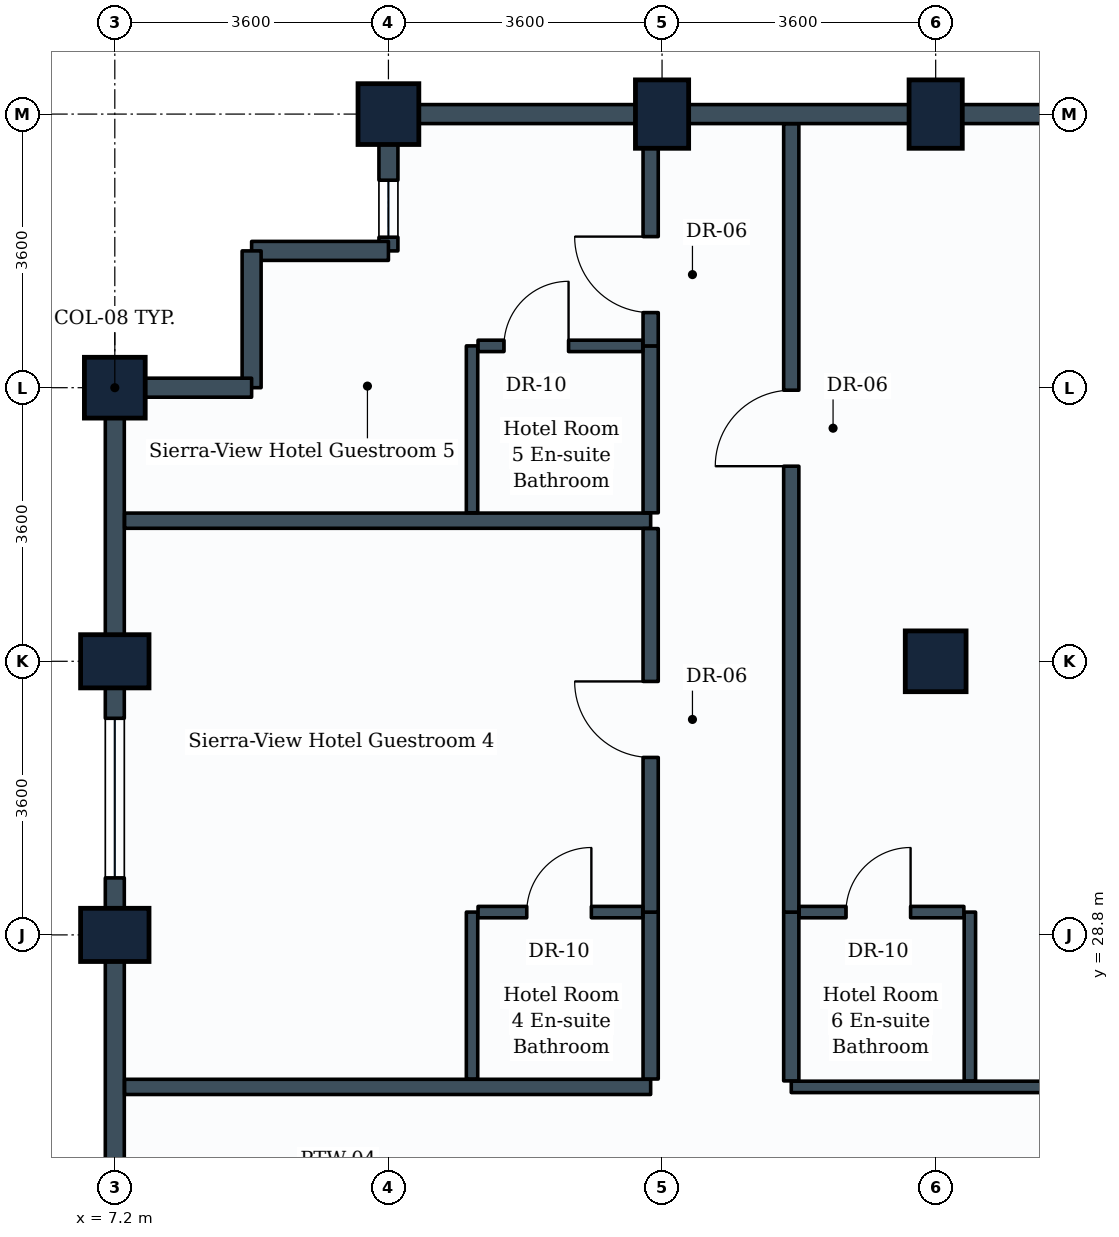
"""IFC4 building model, lengths in metres.
Left out: names, types, materials, properties, quantities, classifications, styles, units other than length and angle.
Written with IfcOpenShell. Run it as: python <this file> out.ifc"""

import sys

from ifc_helpers import new_model, si_unit, direction, frame, frame_2d, origin, origin_2d, place, context, subcontext, project, spatial, rectangle, extrude, element, fill, save


model = new_model("IFC4")
c1 = context("Model", 3, precision=1e-05, world=origin(), true_north=direction((0.0, 1.0)))
c2 = subcontext(c1, "Body", "Model", "MODEL_VIEW")
j1 = project(units=[si_unit("LENGTHUNIT", "METRE"), si_unit("PLANEANGLEUNIT", "RADIAN")], contexts=[c1])
p1 = place(None, origin())
s1 = spatial("IfcSite", under=j1, at=p1, CompositionType="ELEMENT")
p2 = place(p1, origin())
s2 = spatial("IfcBuilding", under=s1, at=p2, CompositionType="ELEMENT")
p3 = place(p2, frame((0.0, 0.0, 217.4)))
s3 = spatial("IfcBuildingStorey", under=s2, at=p3, CompositionType="ELEMENT", Elevation=217.4)
for number, where, z_axis, x_axis in (
    (1, (7.2, 28.8, 0.0), (0.0, 0.0, 1.0), (0.0, 1.0, 0.0)),
    (2, (7.2, 32.4, 0.0), (0.0, 0.0, 1.0), (0.0, 1.0, 0.0)),
):
    element("IfcColumn", number, at=place(p3, frame(where, z_axis=z_axis, x_axis=x_axis)), inside=s3, PredefinedType="COLUMN", context=c2, shape_type="SweptSolid", body=[
        extrude(rectangle(XDim=0.7, YDim=0.9, at=origin_2d()), origin(), (0.0, 0.0, 1.0), 3.6),
    ])
for number, where, z_axis, x_axis in (
    (3, (7.2, 36.0, 0.0), (0.0, 0.0, 1.0), (0.0, 1.0, 0.0)),
    (4, (10.8, 39.6, 0.0), (0.0, 0.0, 1.0), (1.0, 0.0, 0.0)),
):
    element("IfcColumn", number, at=place(p3, frame(where, z_axis=z_axis, x_axis=x_axis)), inside=s3, PredefinedType="COLUMN", context=c2, shape_type="SweptSolid", body=[
        extrude(rectangle(XDim=0.8, YDim=0.8, at=origin_2d()), origin(), (0.0, 0.0, 1.0), 3.6),
    ])
p4 = place(p3, frame((14.4, 39.6, 0.0), z_axis=(0.0, 0.0, 1.0), x_axis=(1.0, 0.0, 0.0)))
e5 = element("IfcColumn", 5, at=p4, inside=s3, PredefinedType="COLUMN", context=c2, shape_type="SweptSolid", body=[
    extrude(rectangle(XDim=0.7, YDim=0.9, at=origin_2d()), origin(), (0.0, 0.0, 1.0), 3.6),
])
p5 = place(p3, frame((18.0, 32.4, 0.0), z_axis=(0.0, 0.0, 1.0), x_axis=(1.0, 0.0, 0.0)))
e6 = element("IfcColumn", 6, at=p5, inside=s3, PredefinedType="COLUMN", context=c2, shape_type="SweptSolid", body=[
    extrude(rectangle(XDim=0.8, YDim=0.8, at=origin_2d()), origin(), (0.0, 0.0, 1.0), 3.6),
])
p6 = place(p3, frame((18.0, 39.6, 0.0), z_axis=(0.0, 0.0, 1.0), x_axis=(1.0, 0.0, 0.0)))
e7 = element("IfcColumn", 7, at=p6, inside=s3, PredefinedType="COLUMN", context=c2, shape_type="SweptSolid", body=[
    extrude(rectangle(XDim=0.7, YDim=0.9, at=origin_2d()), origin(), (0.0, 0.0, 1.0), 3.6),
])
for number, where, z_axis, x_axis in (
    (8, (18.0, 39.6, 0.0), (0.0, 0.0, 1.0), (1.0, 0.0, 0.0)),
    (9, (14.4, 39.6, 0.0), (0.0, 0.0, 1.0), (1.0, 0.0, 0.0)),
):
    element("IfcWall", number, at=place(p3, frame(where, z_axis=z_axis, x_axis=x_axis)), inside=s3, PredefinedType="STANDARD", context=c2, shape_type="SweptSolid", body=[
        extrude(rectangle(XDim=3.6, YDim=0.25, at=frame_2d((1.8, 0.0))), origin(), (0.0, 0.0, 1.0), 2.23),
    ])
p7 = place(p3, frame((10.8, 39.6, 0.0), z_axis=(0.0, 0.0, 1.0), x_axis=(1.0, 0.0, 0.0)))
e10 = element("IfcWall", 10, at=p7, inside=s3, PredefinedType="STANDARD", context=c2, shape_type="SweptSolid", body=[
    extrude(rectangle(XDim=3.6, YDim=0.25, at=frame_2d((1.8, 0.0))), origin(), (0.0, 0.0, 1.0), 2.23),
])
p8 = place(p3, frame((10.8, 37.8, 0.0), z_axis=(0.0, 0.0, 1.0), x_axis=(0.0, 1.0, 0.0)))
e11 = element("IfcWall", 11, at=p8, inside=s3, PredefinedType="STANDARD", context=c2, shape_type="SweptSolid", body=[
    extrude(rectangle(XDim=1.8, YDim=0.25, at=frame_2d((0.9, 0.0))), origin(), (0.0, 0.0, 1.0), 2.23),
])
p9 = place(p8, frame((0.18, 0.0, 0.85)))
e12 = element("IfcOpeningElement", 12, at=p9, cuts=e11, PredefinedType="OPENING", context=c2, shape_type="SweptSolid", body=[
    extrude(rectangle(XDim=0.75, YDim=1.05, at=frame_2d((0.375, 0.525))), frame((0.0, 0.135, 0.0), z_axis=(0.0, -1.0, 0.0), x_axis=(1.0, 0.0, 0.0)), (0.0, 0.0, 1.0), 0.27),
])
p10 = place(p3, frame((9.0, 37.8, 0.0), z_axis=(0.0, 0.0, 1.0), x_axis=(1.0, 0.0, 0.0)))
e13 = element("IfcWall", 13, at=p10, inside=s3, PredefinedType="STANDARD", context=c2, shape_type="SweptSolid", body=[
    extrude(rectangle(XDim=1.8, YDim=0.25, at=frame_2d((0.9, 0.0))), origin(), (0.0, 0.0, 1.0), 3.265),
])
for number, where, z_axis, x_axis in (
    (14, (9.0, 36.0, 0.0), (0.0, 0.0, 1.0), (0.0, 1.0, 0.0)),
    (15, (7.2, 36.0, 0.0), (0.0, 0.0, 1.0), (1.0, 0.0, 0.0)),
):
    element("IfcWall", number, at=place(p3, frame(where, z_axis=z_axis, x_axis=x_axis)), inside=s3, PredefinedType="STANDARD", context=c2, shape_type="SweptSolid", body=[
        extrude(rectangle(XDim=1.8, YDim=0.25, at=frame_2d((0.9, 0.0))), origin(), (0.0, 0.0, 1.0), 2.23),
    ])
p11 = place(p3, frame((7.2, 32.4, 0.0), z_axis=(0.0, 0.0, 1.0), x_axis=(0.0, 1.0, 0.0)))
e16 = element("IfcWall", 16, at=p11, inside=s3, PredefinedType="STANDARD", context=c2, shape_type="SweptSolid", body=[
    extrude(rectangle(XDim=3.6, YDim=0.25, at=frame_2d((1.8, 0.0))), origin(), (0.0, 0.0, 1.0), 2.23),
])
p12 = place(p3, frame((7.2, 28.8, 0.0), z_axis=(0.0, 0.0, 1.0), x_axis=(0.0, 1.0, 0.0)))
e17 = element("IfcWall", 17, at=p12, inside=s3, PredefinedType="STANDARD", context=c2, shape_type="SweptSolid", body=[
    extrude(rectangle(XDim=3.6, YDim=0.25, at=frame_2d((1.8, 0.0))), origin(), (0.0, 0.0, 1.0), 2.83),
])
p13 = place(p12, frame((0.75, 0.0, 0.85)))
e18 = element("IfcOpeningElement", 18, at=p13, cuts=e17, PredefinedType="OPENING", context=c2, shape_type="SweptSolid", body=[
    extrude(rectangle(XDim=2.1, YDim=1.35, at=frame_2d((1.05, 0.675))), frame((0.0, 0.135, 0.0), z_axis=(0.0, -1.0, 0.0), x_axis=(1.0, 0.0, 0.0)), (0.0, 0.0, 1.0), 0.27),
])
p14 = place(p3, frame((7.2, 25.2, 0.0), z_axis=(0.0, 0.0, 1.0), x_axis=(0.0, 1.0, 0.0)))
e19 = element("IfcWall", 19, at=p14, inside=s3, PredefinedType="STANDARD", context=c2, shape_type="SweptSolid", body=[
    extrude(rectangle(XDim=3.6, YDim=0.25, at=frame_2d((1.8, 0.0))), origin(), (0.0, 0.0, 1.0), 2.83),
])
p15 = place(p3, frame((7.329, 26.8, 0.0), z_axis=(0.0, 0.0, 1.0), x_axis=(1.0, 0.0, 0.0)))
e20 = element("IfcWall", 20, at=p15, inside=s3, PredefinedType="PARTITIONING", context=c2, shape_type="SweptSolid", body=[
    extrude(rectangle(XDim=6.921, YDim=0.2, at=frame_2d((3.46, 0.0))), origin(), (0.0, 0.0, 1.0), 2.83),
])
p16 = place(p3, frame((7.329, 34.25, 0.0), z_axis=(0.0, 0.0, 1.0), x_axis=(1.0, 0.0, 0.0)))
e21 = element("IfcWall", 21, at=p16, inside=s3, PredefinedType="PARTITIONING", context=c2, shape_type="SweptSolid", body=[
    extrude(rectangle(XDim=6.921, YDim=0.2, at=frame_2d((3.46, 0.0))), origin(), (0.0, 0.0, 1.0), 3.265),
])
p17 = place(p3, frame((14.25, 26.904, 0.0), z_axis=(0.0, 0.0, 1.0), x_axis=(0.0, 1.0, 0.0)))
e22 = element("IfcWall", 22, at=p17, inside=s3, PredefinedType="PARTITIONING", context=c2, shape_type="SweptSolid", body=[
    extrude(rectangle(XDim=2.196, YDim=0.2, at=frame_2d((1.098, 0.0))), origin(), (0.0, 0.0, 1.0), 2.95),
])
p18 = place(p3, frame((14.25, 29.1, 0.0), z_axis=(0.0, 0.0, 1.0), x_axis=(0.0, 1.0, 0.0)))
e23 = element("IfcWall", 23, at=p18, inside=s3, PredefinedType="PARTITIONING", context=c2, shape_type="SweptSolid", body=[
    extrude(rectangle(XDim=5.046, YDim=0.2, at=frame_2d((2.523, 0.0))), origin(), (0.0, 0.0, 1.0), 3.265),
])
p19 = place(p18, frame((2.035, 0.0, 0.0)))
e24 = element("IfcOpeningElement", 24, at=p19, cuts=e23, PredefinedType="OPENING", context=c2, shape_type="SweptSolid", body=[
    extrude(rectangle(XDim=1.0, YDim=2.1, at=frame_2d((0.5, 1.05))), frame((0.0, 0.11, 0.0), z_axis=(0.0, -1.0, 0.0), x_axis=(1.0, 0.0, 0.0)), (0.0, 0.0, 1.0), 0.22),
])
p20 = place(p3, frame((11.9, 26.904, 0.0), z_axis=(0.0, 0.0, 1.0), x_axis=(0.0, 1.0, 0.0)))
e25 = element("IfcWall", 25, at=p20, inside=s3, PredefinedType="PARTITIONING", context=c2, shape_type="SweptSolid", body=[
    extrude(rectangle(XDim=2.196, YDim=0.15, at=frame_2d((1.098, 0.0))), origin(), (0.0, 0.0, 1.0), 2.95),
])
p21 = place(p3, frame((11.979, 29.1, 0.0), z_axis=(0.0, 0.0, 1.0), x_axis=(1.0, 0.0, 0.0)))
e26 = element("IfcWall", 26, at=p21, inside=s3, PredefinedType="PARTITIONING", context=c2, shape_type="SweptSolid", body=[
    extrude(rectangle(XDim=2.167, YDim=0.15, at=frame_2d((1.083, 0.0))), origin(), (0.0, 0.0, 1.0), 3.265),
])
p22 = place(p21, frame((0.641, 0.0, 0.0)))
e27 = element("IfcOpeningElement", 27, at=p22, cuts=e26, PredefinedType="OPENING", context=c2, shape_type="SweptSolid", body=[
    extrude(rectangle(XDim=0.85, YDim=2.1, at=frame_2d((0.425, 1.05))), frame((0.0, 0.085, 0.0), z_axis=(0.0, -1.0, 0.0), x_axis=(1.0, 0.0, 0.0)), (0.0, 0.0, 1.0), 0.17),
])
p23 = place(p3, frame((14.25, 34.354, 0.0), z_axis=(0.0, 0.0, 1.0), x_axis=(0.0, 1.0, 0.0)))
e28 = element("IfcWall", 28, at=p23, inside=s3, PredefinedType="PARTITIONING", context=c2, shape_type="SweptSolid", body=[
    extrude(rectangle(XDim=2.196, YDim=0.2, at=frame_2d((1.098, 0.0))), origin(), (0.0, 0.0, 1.0), 2.23),
])
p24 = place(p3, frame((14.25, 36.55, 0.0), z_axis=(0.0, 0.0, 1.0), x_axis=(0.0, 1.0, 0.0)))
e29 = element("IfcWall", 29, at=p24, inside=s3, PredefinedType="PARTITIONING", context=c2, shape_type="SweptSolid", body=[
    extrude(rectangle(XDim=2.921, YDim=0.2, at=frame_2d((1.46, 0.0))), origin(), (0.0, 0.0, 1.0), 2.23),
])
p25 = place(p24, frame((0.438, 0.0, 0.0)))
e30 = element("IfcOpeningElement", 30, at=p25, cuts=e29, PredefinedType="OPENING", context=c2, shape_type="SweptSolid", body=[
    extrude(rectangle(XDim=1.0, YDim=2.1, at=frame_2d((0.5, 1.05))), frame((0.0, 0.11, 0.0), z_axis=(0.0, -1.0, 0.0), x_axis=(1.0, 0.0, 0.0)), (0.0, 0.0, 1.0), 0.22),
])
p26 = place(p3, frame((11.9, 34.354, 0.0), z_axis=(0.0, 0.0, 1.0), x_axis=(0.0, 1.0, 0.0)))
e31 = element("IfcWall", 31, at=p26, inside=s3, PredefinedType="PARTITIONING", context=c2, shape_type="SweptSolid", body=[
    extrude(rectangle(XDim=2.196, YDim=0.15, at=frame_2d((1.098, 0.0))), origin(), (0.0, 0.0, 1.0), 2.23),
])
p27 = place(p3, frame((11.979, 36.55, 0.0), z_axis=(0.0, 0.0, 1.0), x_axis=(1.0, 0.0, 0.0)))
e32 = element("IfcWall", 32, at=p27, inside=s3, PredefinedType="PARTITIONING", context=c2, shape_type="SweptSolid", body=[
    extrude(rectangle(XDim=2.167, YDim=0.15, at=frame_2d((1.083, 0.0))), origin(), (0.0, 0.0, 1.0), 2.23),
])
p28 = place(p27, frame((0.341, 0.0, 0.0)))
e33 = element("IfcOpeningElement", 33, at=p28, cuts=e32, PredefinedType="OPENING", context=c2, shape_type="SweptSolid", body=[
    extrude(rectangle(XDim=0.85, YDim=2.1, at=frame_2d((0.425, 1.05))), frame((0.0, 0.085, 0.0), z_axis=(0.0, -1.0, 0.0), x_axis=(1.0, 0.0, 0.0)), (0.0, 0.0, 1.0), 0.17),
])
p29 = place(p3, frame((16.1, 26.8, 0.0), z_axis=(0.0, 0.0, 1.0), x_axis=(1.0, 0.0, 0.0)))
e34 = element("IfcWall", 34, at=p29, inside=s3, PredefinedType="PARTITIONING", context=c2, shape_type="SweptSolid", body=[
    extrude(rectangle(XDim=8.971, YDim=0.15, at=frame_2d((4.485, 0.0))), origin(), (0.0, 0.0, 1.0), 2.23),
])
p30 = place(p3, frame((16.1, 26.879, 0.0), z_axis=(0.0, 0.0, 1.0), x_axis=(0.0, 1.0, 0.0)))
e35 = element("IfcWall", 35, at=p30, inside=s3, PredefinedType="PARTITIONING", context=c2, shape_type="SweptSolid", body=[
    extrude(rectangle(XDim=2.221, YDim=0.2, at=frame_2d((1.111, 0.0))), origin(), (0.0, 0.0, 1.0), 2.95),
])
p31 = place(p3, frame((16.1, 29.1, 0.0), z_axis=(0.0, 0.0, 1.0), x_axis=(0.0, 1.0, 0.0)))
e36 = element("IfcWall", 36, at=p31, inside=s3, PredefinedType="PARTITIONING", context=c2, shape_type="SweptSolid", body=[
    extrude(rectangle(XDim=10.371, YDim=0.2, at=frame_2d((5.186, 0.0))), origin(), (0.0, 0.0, 1.0), 2.23),
])
p32 = place(p31, frame((5.867, 0.0, 0.0)))
e37 = element("IfcOpeningElement", 37, at=p32, cuts=e36, PredefinedType="OPENING", context=c2, shape_type="SweptSolid", body=[
    extrude(rectangle(XDim=1.0, YDim=2.1, at=frame_2d((0.5, 1.05))), frame((0.0, 0.11, 0.0), z_axis=(0.0, -1.0, 0.0), x_axis=(1.0, 0.0, 0.0)), (0.0, 0.0, 1.0), 0.22),
])
p33 = place(p3, frame((18.45, 26.879, 0.0), z_axis=(0.0, 0.0, 1.0), x_axis=(0.0, 1.0, 0.0)))
e38 = element("IfcWall", 38, at=p33, inside=s3, PredefinedType="PARTITIONING", context=c2, shape_type="SweptSolid", body=[
    extrude(rectangle(XDim=2.221, YDim=0.15, at=frame_2d((1.111, 0.0))), origin(), (0.0, 0.0, 1.0), 2.23),
])
p34 = place(p3, frame((16.204, 29.1, 0.0), z_axis=(0.0, 0.0, 1.0), x_axis=(1.0, 0.0, 0.0)))
e39 = element("IfcWall", 39, at=p34, inside=s3, PredefinedType="PARTITIONING", context=c2, shape_type="SweptSolid", body=[
    extrude(rectangle(XDim=2.167, YDim=0.15, at=frame_2d((1.083, 0.0))), origin(), (0.0, 0.0, 1.0), 2.23),
])
p35 = place(p34, frame((0.616, 0.0, 0.0)))
e40 = element("IfcOpeningElement", 40, at=p35, cuts=e39, PredefinedType="OPENING", context=c2, shape_type="SweptSolid", body=[
    extrude(rectangle(XDim=0.85, YDim=2.1, at=frame_2d((0.425, 1.05))), frame((0.0, 0.085, 0.0), z_axis=(0.0, -1.0, 0.0), x_axis=(1.0, 0.0, 0.0)), (0.0, 0.0, 1.0), 0.17),
])
p36 = place(p13, origin())
e41 = element("IfcWindow", 41, at=p36, inside=s3, PartitioningType="SINGLE_PANEL", PredefinedType="WINDOW", context=c2, shape_type="SweptSolid", body=[
    extrude(rectangle(XDim=2.1, YDim=1.35, at=frame_2d((1.05, 0.675))), frame((0.0, 0.03, 0.0), z_axis=(0.0, -1.0, 0.0), x_axis=(1.0, 0.0, 0.0)), (0.0, 0.0, 1.0), 0.06),
])
fill(e18, e41)
p37 = place(p19, origin())
e42 = element("IfcDoor", 42, at=p37, inside=s3, OperationType="SINGLE_SWING_RIGHT", PredefinedType="DOOR", context=c2, shape_type="SweptSolid", body=[
    extrude(rectangle(XDim=1.0, YDim=2.1, at=frame_2d((0.5, 1.05))), frame((0.0, 0.025, 0.0), z_axis=(0.0, -1.0, 0.0), x_axis=(1.0, 0.0, 0.0)), (0.0, 0.0, 1.0), 0.05),
])
fill(e24, e42)
p38 = place(p22, origin())
e43 = element("IfcDoor", 43, at=p38, inside=s3, OperationType="SINGLE_SWING_RIGHT", PredefinedType="DOOR", context=c2, shape_type="SweptSolid", body=[
    extrude(rectangle(XDim=0.85, YDim=2.1, at=frame_2d((0.425, 1.05))), frame((0.0, 0.025, 0.0), z_axis=(0.0, -1.0, 0.0), x_axis=(1.0, 0.0, 0.0)), (0.0, 0.0, 1.0), 0.05),
])
fill(e27, e43)
p39 = place(p25, origin())
e44 = element("IfcDoor", 44, at=p39, inside=s3, OperationType="SINGLE_SWING_RIGHT", PredefinedType="DOOR", context=c2, shape_type="SweptSolid", body=[
    extrude(rectangle(XDim=1.0, YDim=2.1, at=frame_2d((0.5, 1.05))), frame((0.0, 0.025, 0.0), z_axis=(0.0, -1.0, 0.0), x_axis=(1.0, 0.0, 0.0)), (0.0, 0.0, 1.0), 0.05),
])
fill(e30, e44)
p40 = place(p28, origin())
e45 = element("IfcDoor", 45, at=p40, inside=s3, OperationType="SINGLE_SWING_RIGHT", PredefinedType="DOOR", context=c2, shape_type="SweptSolid", body=[
    extrude(rectangle(XDim=0.85, YDim=2.1, at=frame_2d((0.425, 1.05))), frame((0.0, 0.025, 0.0), z_axis=(0.0, -1.0, 0.0), x_axis=(1.0, 0.0, 0.0)), (0.0, 0.0, 1.0), 0.05),
])
fill(e33, e45)
p41 = place(p32, origin())
e46 = element("IfcDoor", 46, at=p41, inside=s3, OperationType="SINGLE_SWING_LEFT", PredefinedType="DOOR", context=c2, shape_type="SweptSolid", body=[
    extrude(rectangle(XDim=1.0, YDim=2.1, at=frame_2d((0.5, 1.05))), frame((0.0, 0.025, 0.0), z_axis=(0.0, -1.0, 0.0), x_axis=(1.0, 0.0, 0.0)), (0.0, 0.0, 1.0), 0.05),
])
fill(e37, e46)
p42 = place(p35, origin())
e47 = element("IfcDoor", 47, at=p42, inside=s3, OperationType="SINGLE_SWING_RIGHT", PredefinedType="DOOR", context=c2, shape_type="SweptSolid", body=[
    extrude(rectangle(XDim=0.85, YDim=2.1, at=frame_2d((0.425, 1.05))), frame((0.0, 0.025, 0.0), z_axis=(0.0, -1.0, 0.0), x_axis=(1.0, 0.0, 0.0)), (0.0, 0.0, 1.0), 0.05),
])
fill(e40, e47)
p43 = place(p9, origin())
e48 = element("IfcWindow", 48, at=p43, inside=s3, PartitioningType="SINGLE_PANEL", PredefinedType="WINDOW", context=c2, shape_type="SweptSolid", body=[
    extrude(rectangle(XDim=0.75, YDim=1.05, at=frame_2d((0.375, 0.525))), frame((0.0, 0.03, 0.0), z_axis=(0.0, -1.0, 0.0), x_axis=(1.0, 0.0, 0.0)), (0.0, 0.0, 1.0), 0.06),
])
fill(e12, e48)
save(model, sys.argv[1])
